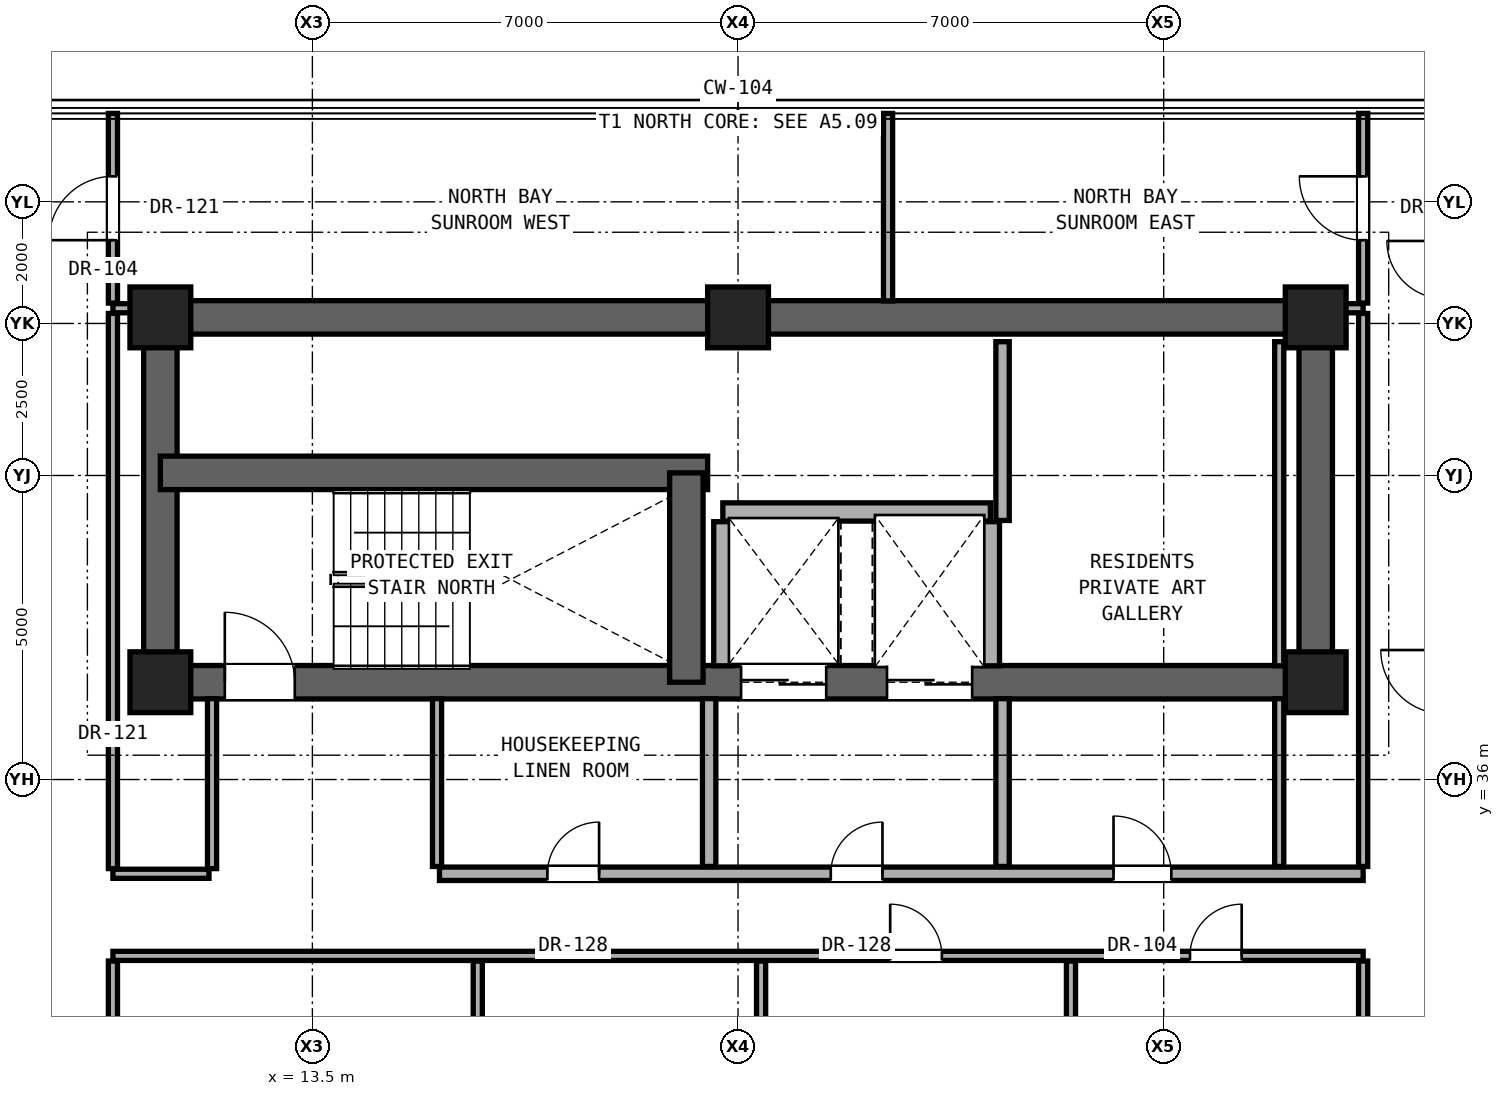
"""IFC4 building model, lengths in metres.
Left out: names, types, materials, properties, quantities, classifications, styles, units other than length and angle.
Written with IfcOpenShell. Run it as: python <this file> out.ifc"""

import sys

from ifc_helpers import new_model, si_unit, direction, frame, frame_2d, origin, origin_2d, place, context, subcontext, project, spatial, rectangle, extrude, element, fill, save


model = new_model("IFC4")
c1 = context("Model", 3, precision=1e-05, world=origin(), true_north=direction((0.0, 1.0)))
c2 = subcontext(c1, "Body", "Model", "MODEL_VIEW")
j1 = project(units=[si_unit("LENGTHUNIT", "METRE"), si_unit("PLANEANGLEUNIT", "RADIAN")], contexts=[c1])
p1 = place(None, origin())
s1 = spatial("IfcSite", under=j1, at=p1, CompositionType="ELEMENT")
p2 = place(p1, origin())
s2 = spatial("IfcBuilding", under=s1, at=p2, CompositionType="ELEMENT")
p3 = place(p2, frame((0.0, 0.0, 180.4)))
s3 = spatial("IfcBuildingStorey", under=s2, at=p3, CompositionType="ELEMENT", Elevation=180.4)
for number, where, z_axis, x_axis in (
    (1, (11.0, 37.6, 0.0), (0.0, 0.0, 1.0), (1.0, 0.0, 0.0)),
    (2, (30.0, 37.6, 0.0), (0.0, 0.0, 1.0), (1.0, 0.0, 0.0)),
    (3, (11.0, 43.6, 0.0), (0.0, 0.0, 1.0), (1.0, 0.0, 0.0)),
    (4, (20.5, 43.6, 0.0), (0.0, 0.0, 1.0), (1.0, 0.0, 0.0)),
    (5, (30.0, 43.6, 0.0), (0.0, 0.0, 1.0), (1.0, 0.0, 0.0)),
):
    element("IfcColumn", number, at=place(p3, frame(where, z_axis=z_axis, x_axis=x_axis)), inside=s3, PredefinedType="COLUMN", context=c2, shape_type="SweptSolid", body=[
        extrude(rectangle(XDim=1.0, YDim=1.0, at=origin_2d()), origin(), (0.0, 0.0, 1.0), 3.25),
    ])
p4 = place(p3, frame((11.0, 43.6, 0.0), z_axis=(0.0, 0.0, 1.0), x_axis=(1.0, 0.0, 0.0)))
e6 = element("IfcWall", 6, at=p4, inside=s3, PredefinedType="SHEAR", context=c2, shape_type="SweptSolid", body=[
    extrude(rectangle(XDim=19.0, YDim=0.55, at=frame_2d((9.5, 0.0))), origin(), (0.0, 0.0, 1.0), 3.05),
])
for number, where, z_axis, x_axis in (
    (7, (11.0, 37.6, 0.0), (0.0, 0.0, 1.0), (0.0, 1.0, 0.0)),
    (8, (30.0, 37.6, 0.0), (0.0, 0.0, 1.0), (0.0, 1.0, 0.0)),
):
    element("IfcWall", number, at=place(p3, frame(where, z_axis=z_axis, x_axis=x_axis)), inside=s3, PredefinedType="SHEAR", context=c2, shape_type="SweptSolid", body=[
        extrude(rectangle(XDim=6.0, YDim=0.55, at=frame_2d((3.0, 0.0))), origin(), (0.0, 0.0, 1.0), 3.05),
    ])
p5 = place(p3, frame((11.0, 37.6, 0.0), z_axis=(0.0, 0.0, 1.0), x_axis=(1.0, 0.0, 0.0)))
e9 = element("IfcWall", 9, at=p5, inside=s3, PredefinedType="SHEAR", context=c2, shape_type="SweptSolid", body=[
    extrude(rectangle(XDim=19.0, YDim=0.55, at=frame_2d((9.5, 0.0))), origin(), (0.0, 0.0, 1.0), 3.05),
])
p6 = place(p5, frame((1.06, 0.0, 0.0)))
e10 = element("IfcOpeningElement", 10, at=p6, cuts=e9, PredefinedType="OPENING", context=c2, shape_type="SweptSolid", body=[
    extrude(rectangle(XDim=1.15, YDim=2.2, at=frame_2d((0.575, 1.1))), frame((0.0, 0.285, 0.0), z_axis=(0.0, -1.0, 0.0), x_axis=(1.0, 0.0, 0.0)), (0.0, 0.0, 1.0), 0.57),
])
p7 = place(p5, frame((9.55, 0.0, 0.0)))
e11 = element("IfcOpeningElement", 11, at=p7, cuts=e9, PredefinedType="OPENING", context=c2, shape_type="SweptSolid", body=[
    extrude(rectangle(XDim=1.4, YDim=2.35, at=frame_2d((0.7, 1.175))), frame((0.0, 0.285, 0.0), z_axis=(0.0, -1.0, 0.0), x_axis=(1.0, 0.0, 0.0)), (0.0, 0.0, 1.0), 0.57),
])
p8 = place(p5, frame((11.95, 0.0, 0.0)))
e12 = element("IfcOpeningElement", 12, at=p8, cuts=e9, PredefinedType="OPENING", context=c2, shape_type="SweptSolid", body=[
    extrude(rectangle(XDim=1.4, YDim=2.35, at=frame_2d((0.7, 1.175))), frame((0.0, 0.285, 0.0), z_axis=(0.0, -1.0, 0.0), x_axis=(1.0, 0.0, 0.0)), (0.0, 0.0, 1.0), 0.57),
])
p9 = place(p3, frame((11.0, 41.043, 0.0), z_axis=(0.0, 0.0, 1.0), x_axis=(1.0, 0.0, 0.0)))
e13 = element("IfcWall", 13, at=p9, inside=s3, PredefinedType="SHEAR", context=c2, shape_type="SweptSolid", body=[
    extrude(rectangle(XDim=9.0, YDim=0.55, at=frame_2d((4.5, 0.0))), origin(), (0.0, 0.0, 1.0), 3.05),
])
p10 = place(p3, frame((19.65, 37.6, 0.0), z_axis=(0.0, 0.0, 1.0), x_axis=(0.0, 1.0, 0.0)))
e14 = element("IfcWall", 14, at=p10, inside=s3, PredefinedType="SHEAR", context=c2, shape_type="SweptSolid", body=[
    extrude(rectangle(XDim=3.443, YDim=0.55, at=frame_2d((1.721, 0.0))), origin(), (0.0, 0.0, 1.0), 3.05),
])
p11 = place(p3, frame((10.22, 33.1, 0.0), z_axis=(0.0, 0.0, 1.0), x_axis=(1.0, 0.0, 0.0)))
e15 = element("IfcWall", 15, at=p11, inside=s3, PredefinedType="PARTITIONING", context=c2, shape_type="SweptSolid", body=[
    extrude(rectangle(XDim=20.56, YDim=0.15, at=frame_2d((10.28, 0.0))), origin(), (0.0, 0.0, 1.0), 2.186),
])
p12 = place(p11, frame((12.782, 0.0, 0.0)))
e16 = element("IfcOpeningElement", 16, at=p12, cuts=e15, PredefinedType="OPENING", context=c2, shape_type="SweptSolid", body=[
    extrude(rectangle(XDim=0.85, YDim=2.01, at=frame_2d((0.425, 1.005))), frame((0.0, 0.085, 0.0), z_axis=(0.0, -1.0, 0.0), x_axis=(1.0, 0.0, 0.0)), (0.0, 0.0, 1.0), 0.17),
])
p13 = place(p11, frame((17.712, 0.0, 0.0)))
e17 = element("IfcOpeningElement", 17, at=p13, cuts=e15, PredefinedType="OPENING", context=c2, shape_type="SweptSolid", body=[
    extrude(rectangle(XDim=0.85, YDim=2.01, at=frame_2d((0.425, 1.005))), frame((0.0, 0.085, 0.0), z_axis=(0.0, -1.0, 0.0), x_axis=(1.0, 0.0, 0.0)), (0.0, 0.0, 1.0), 0.17),
])
p14 = place(p3, frame((10.22, 34.45, 0.0), z_axis=(0.0, 0.0, 1.0), x_axis=(1.0, 0.0, 0.0)))
e18 = element("IfcWall", 18, at=p14, inside=s3, PredefinedType="PARTITIONING", context=c2, shape_type="SweptSolid", body=[
    extrude(rectangle(XDim=1.58, YDim=0.15, at=frame_2d((0.79, 0.0))), origin(), (0.0, 0.0, 1.0), 2.186),
])
p15 = place(p3, frame((15.59, 34.45, 0.0), z_axis=(0.0, 0.0, 1.0), x_axis=(1.0, 0.0, 0.0)))
e19 = element("IfcWall", 19, at=p15, inside=s3, PredefinedType="SOLIDWALL", context=c2, shape_type="SweptSolid", body=[
    extrude(rectangle(XDim=15.19, YDim=0.22, at=frame_2d((7.595, 0.0))), origin(), (0.0, 0.0, 1.0), 2.186),
])
p16 = place(p15, frame((6.435, 0.0, 0.0)))
e20 = element("IfcOpeningElement", 20, at=p16, cuts=e19, PredefinedType="OPENING", context=c2, shape_type="SweptSolid", body=[
    extrude(rectangle(XDim=0.85, YDim=2.01, at=frame_2d((0.425, 1.005))), frame((0.0, 0.12, 0.0), z_axis=(0.0, -1.0, 0.0), x_axis=(1.0, 0.0, 0.0)), (0.0, 0.0, 1.0), 0.24),
])
p17 = place(p15, frame((11.085, 0.0, 0.0)))
e21 = element("IfcOpeningElement", 21, at=p17, cuts=e19, PredefinedType="OPENING", context=c2, shape_type="SweptSolid", body=[
    extrude(rectangle(XDim=0.95, YDim=2.15, at=frame_2d((0.475, 1.075))), frame((0.0, 0.12, 0.0), z_axis=(0.0, -1.0, 0.0), x_axis=(1.0, 0.0, 0.0)), (0.0, 0.0, 1.0), 0.24),
])
p18 = place(p15, frame((1.775, 0.0, 0.0)))
e22 = element("IfcOpeningElement", 22, at=p18, cuts=e19, PredefinedType="OPENING", context=c2, shape_type="SweptSolid", body=[
    extrude(rectangle(XDim=0.85, YDim=2.01, at=frame_2d((0.425, 1.005))), frame((0.0, 0.12, 0.0), z_axis=(0.0, -1.0, 0.0), x_axis=(1.0, 0.0, 0.0)), (0.0, 0.0, 1.0), 0.24),
])
p19 = place(p3, frame((20.25, 40.4, 0.0), z_axis=(0.0, 0.0, 1.0), x_axis=(1.0, 0.0, 0.0)))
e23 = element("IfcWall", 23, at=p19, inside=s3, PredefinedType="SOLIDWALL", context=c2, shape_type="SweptSolid", body=[
    extrude(rectangle(XDim=4.4, YDim=0.3, at=frame_2d((2.2, 0.0))), origin(), (0.0, 0.0, 1.0), 3.05),
])
for number, where, z_axis, x_axis in (
    (24, (10.22, 43.75, 0.0), (0.0, 0.0, 1.0), (1.0, 0.0, 0.0)),
    (25, (30.27, 43.75, 0.0), (0.0, 0.0, 1.0), (1.0, 0.0, 0.0)),
):
    element("IfcWall", number, at=place(p3, frame(where, z_axis=z_axis, x_axis=x_axis)), inside=s3, PredefinedType="PARTITIONING", context=c2, shape_type="SweptSolid", body=[
        extrude(rectangle(XDim=0.51, YDim=0.15, at=frame_2d((0.255, 0.0))), origin(), (0.0, 0.0, 1.0), 3.05),
    ])
p20 = place(p3, frame((10.22, 22.935, 0.0), z_axis=(0.0, 0.0, 1.0), x_axis=(0.0, 1.0, 0.0)))
e26 = element("IfcWall", 26, at=p20, inside=s3, PredefinedType="PARTITIONING", context=c2, shape_type="SweptSolid", body=[
    extrude(rectangle(XDim=10.08, YDim=0.15, at=frame_2d((5.04, 0.0))), origin(), (0.0, 0.0, 1.0), 2.346),
])
p21 = place(p20, frame((4.565, 0.0, 0.0)))
e27 = element("IfcOpeningElement", 27, at=p21, cuts=e26, PredefinedType="OPENING", context=c2, shape_type="SweptSolid", body=[
    extrude(rectangle(XDim=0.95, YDim=2.15, at=frame_2d((0.475, 1.075))), frame((0.0, 0.085, 0.0), z_axis=(0.0, -1.0, 0.0), x_axis=(1.0, 0.0, 0.0)), (0.0, 0.0, 1.0), 0.17),
])
p22 = place(p3, frame((10.22, 34.535, 0.0), z_axis=(0.0, 0.0, 1.0), x_axis=(0.0, 1.0, 0.0)))
e28 = element("IfcWall", 28, at=p22, inside=s3, PredefinedType="PARTITIONING", context=c2, shape_type="SweptSolid", body=[
    extrude(rectangle(XDim=9.13, YDim=0.15, at=frame_2d((4.565, 0.0))), origin(), (0.0, 0.0, 1.0), 2.442),
])
p23 = place(p3, frame((10.22, 43.835, 0.0), z_axis=(0.0, 0.0, 1.0), x_axis=(0.0, 1.0, 0.0)))
e29 = element("IfcWall", 29, at=p23, inside=s3, PredefinedType="PARTITIONING", context=c2, shape_type="SweptSolid", body=[
    extrude(rectangle(XDim=3.119, YDim=0.15, at=frame_2d((1.56, 0.0))), origin(), (0.0, 0.0, 1.0), 3.05),
])
p24 = place(p23, frame((1.034, 0.0, 0.0)))
e30 = element("IfcOpeningElement", 30, at=p24, cuts=e29, PredefinedType="OPENING", context=c2, shape_type="SweptSolid", body=[
    extrude(rectangle(XDim=1.05, YDim=2.2, at=frame_2d((0.525, 1.1))), frame((0.0, 0.085, 0.0), z_axis=(0.0, -1.0, 0.0), x_axis=(1.0, 0.0, 0.0)), (0.0, 0.0, 1.0), 0.17),
])
p25 = place(p3, frame((11.85, 34.535, 0.0), z_axis=(0.0, 0.0, 1.0), x_axis=(0.0, 1.0, 0.0)))
e31 = element("IfcWall", 31, at=p25, inside=s3, PredefinedType="PARTITIONING", context=c2, shape_type="SweptSolid", body=[
    extrude(rectangle(XDim=2.795, YDim=0.15, at=frame_2d((1.397, 0.0))), origin(), (0.0, 0.0, 1.0), 3.05),
])
p26 = place(p3, frame((15.55, 34.57, 0.0), z_axis=(0.0, 0.0, 1.0), x_axis=(0.0, 1.0, 0.0)))
e32 = element("IfcWall", 32, at=p26, inside=s3, PredefinedType="PARTITIONING", context=c2, shape_type="SweptSolid", body=[
    extrude(rectangle(XDim=2.76, YDim=0.15, at=frame_2d((1.38, 0.0))), origin(), (0.0, 0.0, 1.0), 3.05),
])
p27 = place(p3, frame((16.22, 22.935, 0.0), z_axis=(0.0, 0.0, 1.0), x_axis=(0.0, 1.0, 0.0)))
e33 = element("IfcWall", 33, at=p27, inside=s3, PredefinedType="PARTITIONING", context=c2, shape_type="SweptSolid", body=[
    extrude(rectangle(XDim=10.08, YDim=0.15, at=frame_2d((5.04, 0.0))), origin(), (0.0, 0.0, 1.0), 2.186),
])
p28 = place(p3, frame((20.025, 34.57, 0.0), z_axis=(0.0, 0.0, 1.0), x_axis=(0.0, 1.0, 0.0)))
e34 = element("IfcWall", 34, at=p28, inside=s3, PredefinedType="SOLIDWALL", context=c2, shape_type="SweptSolid", body=[
    extrude(rectangle(XDim=2.76, YDim=0.22, at=frame_2d((1.38, 0.0))), origin(), (0.0, 0.0, 1.0), 3.05),
])
p29 = place(p3, frame((20.25, 37.87, 0.0), z_axis=(0.0, 0.0, 1.0), x_axis=(0.0, 1.0, 0.0)))
e35 = element("IfcWall", 35, at=p29, inside=s3, PredefinedType="SOLIDWALL", context=c2, shape_type="SweptSolid", body=[
    extrude(rectangle(XDim=2.37, YDim=0.3, at=frame_2d((1.185, 0.0))), origin(), (0.0, 0.0, 1.0), 3.05),
])
p30 = place(p3, frame((20.879, 19.985, 0.0), z_axis=(0.0, 0.0, 1.0), x_axis=(0.0, 1.0, 0.0)))
e36 = element("IfcWall", 36, at=p30, inside=s3, PredefinedType="PARTITIONING", context=c2, shape_type="SweptSolid", body=[
    extrude(rectangle(XDim=13.03, YDim=0.15, at=frame_2d((6.515, 0.0))), origin(), (0.0, 0.0, 1.0), 2.186),
])
p31 = place(p3, frame((22.967, 43.87, 0.0), z_axis=(0.0, 0.0, 1.0), x_axis=(0.0, 1.0, 0.0)))
e37 = element("IfcWall", 37, at=p31, inside=s3, PredefinedType="PARTITIONING", context=c2, shape_type="SweptSolid", body=[
    extrude(rectangle(XDim=3.084, YDim=0.15, at=frame_2d((1.542, 0.0))), origin(), (0.0, 0.0, 1.0), 3.05),
])
p32 = place(p3, frame((24.65, 37.87, 0.0), z_axis=(0.0, 0.0, 1.0), x_axis=(0.0, 1.0, 0.0)))
e38 = element("IfcWall", 38, at=p32, inside=s3, PredefinedType="SOLIDWALL", context=c2, shape_type="SweptSolid", body=[
    extrude(rectangle(XDim=2.37, YDim=0.3, at=frame_2d((1.185, 0.0))), origin(), (0.0, 0.0, 1.0), 3.05),
])
p33 = place(p3, frame((24.85, 34.57, 0.0), z_axis=(0.0, 0.0, 1.0), x_axis=(0.0, 1.0, 0.0)))
e39 = element("IfcWall", 39, at=p33, inside=s3, PredefinedType="SOLIDWALL", context=c2, shape_type="SweptSolid", body=[
    extrude(rectangle(XDim=2.76, YDim=0.22, at=frame_2d((1.38, 0.0))), origin(), (0.0, 0.0, 1.0), 3.05),
])
p34 = place(p3, frame((24.85, 40.26, 0.0), z_axis=(0.0, 0.0, 1.0), x_axis=(0.0, 1.0, 0.0)))
e40 = element("IfcWall", 40, at=p34, inside=s3, PredefinedType="SOLIDWALL", context=c2, shape_type="SweptSolid", body=[
    extrude(rectangle(XDim=2.94, YDim=0.22, at=frame_2d((1.47, 0.0))), origin(), (0.0, 0.0, 1.0), 3.05),
])
p35 = place(p3, frame((25.975, 19.985, 0.0), z_axis=(0.0, 0.0, 1.0), x_axis=(0.0, 1.0, 0.0)))
e41 = element("IfcWall", 41, at=p35, inside=s3, PredefinedType="PARTITIONING", context=c2, shape_type="SweptSolid", body=[
    extrude(rectangle(XDim=13.03, YDim=0.15, at=frame_2d((6.515, 0.0))), origin(), (0.0, 0.0, 1.0), 2.186),
])
p36 = place(p3, frame((29.4, 34.57, 0.0), z_axis=(0.0, 0.0, 1.0), x_axis=(0.0, 1.0, 0.0)))
e42 = element("IfcWall", 42, at=p36, inside=s3, PredefinedType="PARTITIONING", context=c2, shape_type="SweptSolid", body=[
    extrude(rectangle(XDim=2.76, YDim=0.15, at=frame_2d((1.38, 0.0))), origin(), (0.0, 0.0, 1.0), 3.05),
])
p37 = place(p3, frame((29.4, 37.87, 0.0), z_axis=(0.0, 0.0, 1.0), x_axis=(0.0, 1.0, 0.0)))
e43 = element("IfcWall", 43, at=p37, inside=s3, PredefinedType="PARTITIONING", context=c2, shape_type="SweptSolid", body=[
    extrude(rectangle(XDim=5.33, YDim=0.15, at=frame_2d((2.665, 0.0))), origin(), (0.0, 0.0, 1.0), 3.05),
])
p38 = place(p3, frame((30.78, 19.985, 0.0), z_axis=(0.0, 0.0, 1.0), x_axis=(0.0, 1.0, 0.0)))
e44 = element("IfcWall", 44, at=p38, inside=s3, PredefinedType="PARTITIONING", context=c2, shape_type="SweptSolid", body=[
    extrude(rectangle(XDim=13.03, YDim=0.15, at=frame_2d((6.515, 0.0))), origin(), (0.0, 0.0, 1.0), 2.346),
])
p39 = place(p3, frame((30.78, 34.57, 0.0), z_axis=(0.0, 0.0, 1.0), x_axis=(0.0, 1.0, 0.0)))
e45 = element("IfcWall", 45, at=p39, inside=s3, PredefinedType="PARTITIONING", context=c2, shape_type="SweptSolid", body=[
    extrude(rectangle(XDim=9.095, YDim=0.15, at=frame_2d((4.547, 0.0))), origin(), (0.0, 0.0, 1.0), 2.442),
])
p40 = place(p3, frame((30.78, 43.835, 0.0), z_axis=(0.0, 0.0, 1.0), x_axis=(0.0, 1.0, 0.0)))
e46 = element("IfcWall", 46, at=p40, inside=s3, PredefinedType="PARTITIONING", context=c2, shape_type="SweptSolid", body=[
    extrude(rectangle(XDim=3.119, YDim=0.15, at=frame_2d((1.56, 0.0))), origin(), (0.0, 0.0, 1.0), 3.05),
])
p41 = place(p40, frame((1.034, 0.0, 0.0)))
e47 = element("IfcOpeningElement", 47, at=p41, cuts=e46, PredefinedType="OPENING", context=c2, shape_type="SweptSolid", body=[
    extrude(rectangle(XDim=1.05, YDim=2.2, at=frame_2d((0.525, 1.1))), frame((0.0, 0.085, 0.0), z_axis=(0.0, -1.0, 0.0), x_axis=(1.0, 0.0, 0.0)), (0.0, 0.0, 1.0), 0.17),
])
p42 = place(p6, origin())
e48 = element("IfcDoor", 48, at=p42, inside=s3, OperationType="SINGLE_SWING_LEFT", PredefinedType="DOOR", context=c2, shape_type="SweptSolid", body=[
    extrude(rectangle(XDim=1.15, YDim=2.2, at=frame_2d((0.575, 1.1))), frame((0.0, 0.025, 0.0), z_axis=(0.0, -1.0, 0.0), x_axis=(1.0, 0.0, 0.0)), (0.0, 0.0, 1.0), 0.05),
])
fill(e10, e48)
p43 = place(p16, origin())
e49 = element("IfcDoor", 49, at=p43, inside=s3, OperationType="SINGLE_SWING_RIGHT", PredefinedType="DOOR", context=c2, shape_type="SweptSolid", body=[
    extrude(rectangle(XDim=0.85, YDim=2.01, at=frame_2d((0.425, 1.005))), frame((0.0, 0.025, 0.0), z_axis=(0.0, -1.0, 0.0), x_axis=(1.0, 0.0, 0.0)), (0.0, 0.0, 1.0), 0.05),
])
fill(e20, e49)
p44 = place(p17, origin())
e50 = element("IfcDoor", 50, at=p44, inside=s3, OperationType="SINGLE_SWING_LEFT", PredefinedType="DOOR", context=c2, shape_type="SweptSolid", body=[
    extrude(rectangle(XDim=0.95, YDim=2.15, at=frame_2d((0.475, 1.075))), frame((0.0, 0.025, 0.0), z_axis=(0.0, -1.0, 0.0), x_axis=(1.0, 0.0, 0.0)), (0.0, 0.0, 1.0), 0.05),
])
fill(e21, e50)
p45 = place(p18, origin())
e51 = element("IfcDoor", 51, at=p45, inside=s3, OperationType="SINGLE_SWING_RIGHT", PredefinedType="DOOR", context=c2, shape_type="SweptSolid", body=[
    extrude(rectangle(XDim=0.85, YDim=2.01, at=frame_2d((0.425, 1.005))), frame((0.0, 0.025, 0.0), z_axis=(0.0, -1.0, 0.0), x_axis=(1.0, 0.0, 0.0)), (0.0, 0.0, 1.0), 0.05),
])
fill(e22, e51)
p46 = place(p12, origin())
e52 = element("IfcDoor", 52, at=p46, inside=s3, OperationType="SINGLE_SWING_LEFT", PredefinedType="DOOR", context=c2, shape_type="SweptSolid", body=[
    extrude(rectangle(XDim=0.85, YDim=2.01, at=frame_2d((0.425, 1.005))), frame((0.0, 0.025, 0.0), z_axis=(0.0, -1.0, 0.0), x_axis=(1.0, 0.0, 0.0)), (0.0, 0.0, 1.0), 0.05),
])
fill(e16, e52)
p47 = place(p13, origin())
e53 = element("IfcDoor", 53, at=p47, inside=s3, OperationType="SINGLE_SWING_RIGHT", PredefinedType="DOOR", context=c2, shape_type="SweptSolid", body=[
    extrude(rectangle(XDim=0.85, YDim=2.01, at=frame_2d((0.425, 1.005))), frame((0.0, 0.025, 0.0), z_axis=(0.0, -1.0, 0.0), x_axis=(1.0, 0.0, 0.0)), (0.0, 0.0, 1.0), 0.05),
])
fill(e17, e53)
p48 = place(p24, origin())
e54 = element("IfcDoor", 54, at=p48, inside=s3, OperationType="SINGLE_SWING_LEFT", PredefinedType="DOOR", context=c2, shape_type="SweptSolid", body=[
    extrude(rectangle(XDim=1.05, YDim=2.2, at=frame_2d((0.525, 1.1))), frame((0.0, 0.025, 0.0), z_axis=(0.0, -1.0, 0.0), x_axis=(1.0, 0.0, 0.0)), (0.0, 0.0, 1.0), 0.05),
])
fill(e30, e54)
p49 = place(p41, origin())
e55 = element("IfcDoor", 55, at=p49, inside=s3, OperationType="SINGLE_SWING_RIGHT", PredefinedType="DOOR", context=c2, shape_type="SweptSolid", body=[
    extrude(rectangle(XDim=1.05, YDim=2.2, at=frame_2d((0.525, 1.1))), frame((0.0, 0.025, 0.0), z_axis=(0.0, -1.0, 0.0), x_axis=(1.0, 0.0, 0.0)), (0.0, 0.0, 1.0), 0.05),
])
fill(e47, e55)
p50 = place(p7, origin())
e56 = element("IfcDoor", 56, at=p50, inside=s3, OperationType="DOUBLE_DOOR_SLIDING", PredefinedType="DOOR", context=c2, shape_type="SweptSolid", body=[
    extrude(rectangle(XDim=1.4, YDim=2.35, at=frame_2d((0.7, 1.175))), frame((0.0, 0.025, 0.0), z_axis=(0.0, -1.0, 0.0), x_axis=(1.0, 0.0, 0.0)), (0.0, 0.0, 1.0), 0.05),
])
fill(e11, e56)
p51 = place(p8, origin())
e57 = element("IfcDoor", 57, at=p51, inside=s3, OperationType="DOUBLE_DOOR_SLIDING", PredefinedType="DOOR", context=c2, shape_type="SweptSolid", body=[
    extrude(rectangle(XDim=1.4, YDim=2.35, at=frame_2d((0.7, 1.175))), frame((0.0, 0.025, 0.0), z_axis=(0.0, -1.0, 0.0), x_axis=(1.0, 0.0, 0.0)), (0.0, 0.0, 1.0), 0.05),
])
fill(e12, e57)
save(model, sys.argv[1])
